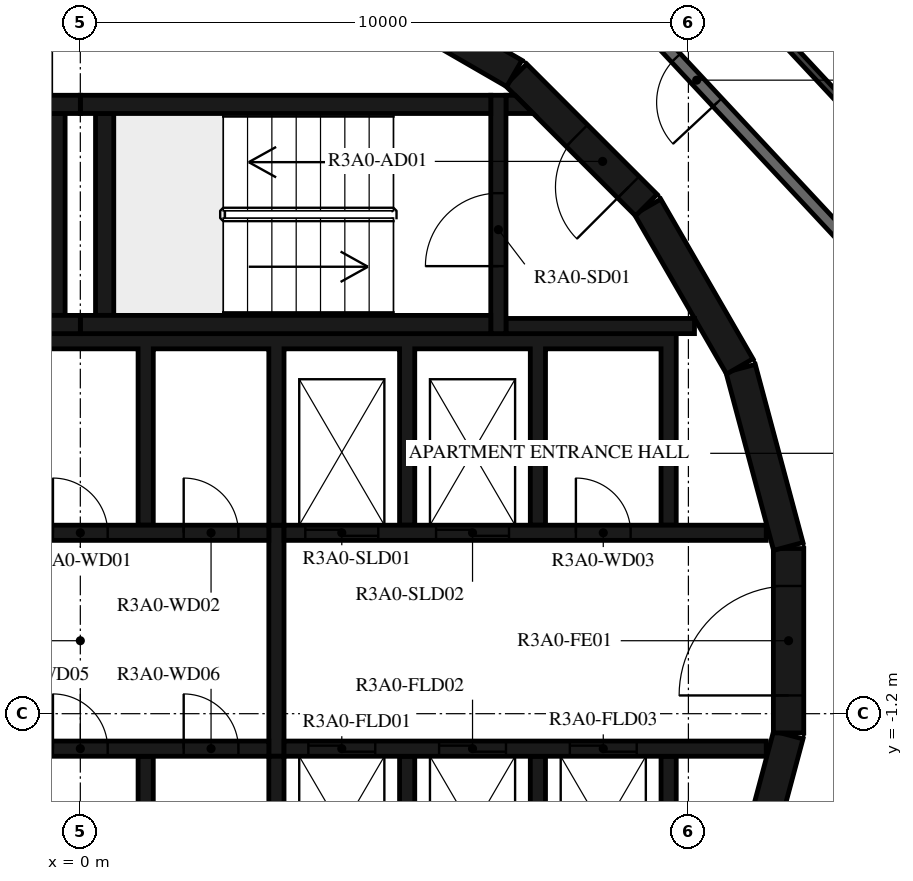
"""IFC4 building model, lengths in metres.
Left out: names, types, materials, properties, quantities, classifications, styles, units other than length and angle.
Written with IfcOpenShell. Run it as: python <this file> out.ifc"""

import sys

from ifc_helpers import new_model, si_unit, direction, frame, frame_2d, origin, place, context, subcontext, project, spatial, polyline, rectangle, outline, extrude, element, fill, save


model = new_model("IFC4")
c1 = context("Model", 3, precision=1e-05, world=origin(), true_north=direction((0.0, 1.0)))
c2 = subcontext(c1, "Body", "Model", "MODEL_VIEW")
j1 = project(units=[si_unit("LENGTHUNIT", "METRE"), si_unit("PLANEANGLEUNIT", "RADIAN")], contexts=[c1])
p1 = place(None, origin())
s1 = spatial("IfcSite", under=j1, at=p1, CompositionType="ELEMENT")
p2 = place(p1, origin())
s2 = spatial("IfcBuilding", under=s1, at=p2, CompositionType="ELEMENT")
p3 = place(p2, frame((0.0, 0.0, 120.4)))
s3 = spatial("IfcBuildingStorey", under=s2, at=p3, CompositionType="ELEMENT", Elevation=120.4)
p4 = place(p3, frame((10.858, -4.479, 0.0), z_axis=(0.0, 0.0, 1.0), x_axis=(0.258734743916, 0.965948410781, 0.0)))
e1 = element("IfcWall", 1, at=p4, inside=s3, PredefinedType="SHEAR", context=c2, shape_type="SweptSolid", body=[
    extrude(rectangle(XDim=3.033, YDim=0.5, at=frame_2d((1.516, 0.0))), origin(), (0.0, 0.0, 1.0), 3.12),
])
p5 = place(p3, frame((11.647, -1.516, 0.0), z_axis=(0.0, 0.0, 1.0), x_axis=(0.0, 1.0, 0.0)))
e2 = element("IfcWall", 2, at=p5, inside=s3, PredefinedType="SHEAR", context=c2, shape_type="SweptSolid", body=[
    extrude(rectangle(XDim=3.033, YDim=0.5, at=frame_2d((1.516, 0.0))), origin(), (0.0, 0.0, 1.0), 3.12),
])
p6 = place(p5, frame((0.616, 0.0, 0.0)))
e3 = element("IfcOpeningElement", 3, at=p6, cuts=e2, PredefinedType="OPENING", context=c2, shape_type="SweptSolid", body=[
    extrude(rectangle(XDim=1.8, YDim=2.1, at=frame_2d((0.9, 1.05))), frame((0.0, 0.26, 0.0), z_axis=(0.0, -1.0, 0.0), x_axis=(1.0, 0.0, 0.0)), (0.0, 0.0, 1.0), 0.52),
])
for number, where, z_axis, x_axis in (
    (4, (11.643, 1.55, 0.0), (0.0, 0.0, 1.0), (-0.259, 0.966, 0.0)),
    (5, (10.845, 4.51, 0.0), (0.0, 0.0, 1.0), (-0.5, 0.866, 0.0)),
):
    element("IfcWall", number, at=place(p3, frame(where, z_axis=z_axis, x_axis=x_axis)), inside=s3, PredefinedType="SHEAR", context=c2, shape_type="SweptSolid", body=[
        extrude(rectangle(XDim=3.033, YDim=0.5, at=frame_2d((1.516, 0.0))), origin(), (0.0, 0.0, 1.0), 3.12),
    ])
p7 = place(p3, frame((9.308, 7.164, 0.0), z_axis=(0.0, 0.0, 1.0), x_axis=(-0.707106781187, 0.707106781187, 0.0)))
e6 = element("IfcWall", 6, at=p7, inside=s3, PredefinedType="SHEAR", context=c2, shape_type="SweptSolid", body=[
    extrude(rectangle(XDim=3.032, YDim=0.5, at=frame_2d((1.516, 0.0))), origin(), (0.0, 0.0, 1.0), 3.12),
])
p8 = place(p7, frame((0.416, 0.0, 0.0)))
e7 = element("IfcOpeningElement", 7, at=p8, cuts=e6, PredefinedType="OPENING", context=c2, shape_type="SweptSolid", body=[
    extrude(rectangle(XDim=1.2, YDim=2.1, at=frame_2d((0.6, 1.05))), frame((0.0, 0.26, 0.0), z_axis=(0.0, -1.0, 0.0), x_axis=(1.0, 0.0, 0.0)), (0.0, 0.0, 1.0), 0.52),
])
p9 = place(p3, frame((7.137, 9.329, 0.0), z_axis=(0.0, 0.0, 1.0), x_axis=(-0.865975092491, 0.500087131594, 0.0)))
e8 = element("IfcWall", 8, at=p9, inside=s3, PredefinedType="SHEAR", context=c2, shape_type="SweptSolid", body=[
    extrude(rectangle(XDim=3.033, YDim=0.5, at=frame_2d((1.516, 0.0))), origin(), (0.0, 0.0, 1.0), 3.12),
])
for number, where, z_axis, x_axis in (
    (9, (0.0, 5.2, 0.0), (0.0, 0.0, 1.0), (1.0, 0.0, 0.0)),
    (10, (0.0, 8.82, 0.0), (0.0, 0.0, 1.0), (1.0, 0.0, 0.0)),
):
    element("IfcWall", number, at=place(p3, frame(where, z_axis=z_axis, x_axis=x_axis)), inside=s3, PredefinedType="SHEAR", context=c2, shape_type="SweptSolid", body=[
        extrude(rectangle(XDim=6.75, YDim=0.3, at=frame_2d((3.375, 0.0))), origin(), (0.0, 0.0, 1.0), 3.12),
    ])
p10 = place(p3, frame((0.4, 5.35, 0.0), z_axis=(0.0, 0.0, 1.0), x_axis=(0.0, 1.0, 0.0)))
e11 = element("IfcWall", 11, at=p10, inside=s3, PredefinedType="SHEAR", context=c2, shape_type="SweptSolid", body=[
    extrude(rectangle(XDim=3.32, YDim=0.3, at=frame_2d((1.66, 0.0))), origin(), (0.0, 0.0, 1.0), 3.12),
])
p11 = place(p3, frame((6.875, 5.05, 0.0), z_axis=(0.0, 0.0, 1.0), x_axis=(0.0, 1.0, 0.0)))
e12 = element("IfcWall", 12, at=p11, inside=s3, PredefinedType="SHEAR", context=c2, shape_type="SweptSolid", body=[
    extrude(rectangle(XDim=3.92, YDim=0.25, at=frame_2d((1.96, 0.0))), origin(), (0.0, 0.0, 1.0), 3.12),
])
p12 = place(p11, frame((1.11, 0.0, 0.0)))
e13 = element("IfcOpeningElement", 13, at=p12, cuts=e12, PredefinedType="OPENING", context=c2, shape_type="SweptSolid", body=[
    extrude(rectangle(XDim=1.2, YDim=2.1, at=frame_2d((0.6, 1.05))), frame((0.0, 0.135, 0.0), z_axis=(0.0, -1.0, 0.0), x_axis=(1.0, 0.0, 0.0)), (0.0, 0.0, 1.0), 0.27),
])
p13 = place(p3, frame((7.0, 5.175, 0.0), z_axis=(0.0, 0.0, 1.0), x_axis=(1.0, 0.0, 0.0)))
e14 = element("IfcWall", 14, at=p13, inside=s3, PredefinedType="SHEAR", context=c2, shape_type="SweptSolid", body=[
    extrude(rectangle(XDim=3.1, YDim=0.25, at=frame_2d((1.55, 0.0))), origin(), (0.0, 0.0, 1.0), 3.12),
])
p14 = place(p3, origin())
e15 = element("IfcWall", 15, at=p14, inside=s3, PredefinedType="SHEAR", context=c2, shape_type="SweptSolid", body=[
    extrude(outline(polyline([(7.448, 8.67), (7.0, 8.67), (7.0, 8.97), (7.148, 8.97), (7.448, 8.67)])), origin(), (0.0, 0.0, 1.0), 3.12),
])
for number, where, z_axis, x_axis in (
    (16, (-6.75, 5.2, 0.0), (0.0, 0.0, 1.0), (1.0, 0.0, 0.0)),
    (17, (-6.75, 8.82, 0.0), (0.0, 0.0, 1.0), (1.0, 0.0, 0.0)),
):
    element("IfcWall", number, at=place(p3, frame(where, z_axis=z_axis, x_axis=x_axis)), inside=s3, PredefinedType="SHEAR", context=c2, shape_type="SweptSolid", body=[
        extrude(rectangle(XDim=6.75, YDim=0.3, at=frame_2d((3.375, 0.0))), origin(), (0.0, 0.0, 1.0), 3.12),
    ])
p15 = place(p3, frame((-0.4, 5.35, 0.0), z_axis=(0.0, 0.0, 1.0), x_axis=(0.0, 1.0, 0.0)))
e18 = element("IfcWall", 18, at=p15, inside=s3, PredefinedType="SHEAR", context=c2, shape_type="SweptSolid", body=[
    extrude(rectangle(XDim=3.32, YDim=0.3, at=frame_2d((1.66, 0.0))), origin(), (0.0, 0.0, 1.0), 3.12),
])
p16 = place(p3, origin())
e19 = element("IfcWall", 19, at=p16, inside=s3, PredefinedType="SHEAR", context=c2, shape_type="SweptSolid", body=[
    extrude(outline(polyline([(-9.55, 4.8), (-7.65, 4.8), (-7.65, 1.9), (-7.4, 1.9), (-7.4, 4.8), (-5.5, 4.8), (-5.5, 1.9), (-5.25, 1.9), (-5.25, 4.8), (-3.35, 4.8), (-3.35, 1.9), (-3.1, 1.9), (-3.1, 4.8), (-1.2, 4.8), (-1.2, 1.9), (-0.95, 1.9), (-0.95, 4.8), (0.95, 4.8), (0.95, 1.9), (1.2, 1.9), (1.2, 4.8), (3.1, 4.8), (3.1, 1.9), (3.35, 1.9), (3.35, 4.8), (5.25, 4.8), (5.25, 1.9), (5.5, 1.9), (5.5, 4.8), (7.4, 4.8), (7.4, 1.9), (7.65, 1.9), (7.65, 4.8), (9.55, 4.8), (9.55, 1.9), (9.8, 1.9), (9.8, 4.8), (9.8, 5.05), (-9.8, 5.05), (-9.8, 4.8), (-9.8, 1.9), (-9.55, 1.9), (-9.55, 4.8)])), origin(), (0.0, 0.0, 1.0), 3.12),
])
p17 = place(p3, origin())
e20 = element("IfcWall", 20, at=p17, inside=s3, PredefinedType="SHEAR", context=c2, shape_type="SweptSolid", body=[
    extrude(outline(polyline([(9.8, -5.05), (9.8, -4.8), (9.8, -1.9), (9.55, -1.9), (9.55, -4.8), (7.65, -4.8), (7.65, -1.9), (7.4, -1.9), (7.4, -4.8), (5.5, -4.8), (5.5, -1.9), (5.25, -1.9), (5.25, -4.8), (3.35, -4.8), (3.35, -1.9), (3.1, -1.9), (3.1, -4.8), (1.2, -4.8), (1.2, -1.9), (0.95, -1.9), (0.95, -4.8), (-0.95, -4.8), (-0.95, -1.9), (-1.2, -1.9), (-1.2, -4.8), (-5.25, -4.8), (-5.25, -1.9), (-5.5, -1.9), (-5.5, -4.8), (-7.4, -4.8), (-7.4, -1.9), (-7.65, -1.9), (-7.65, -4.8), (-9.55, -4.8), (-9.55, -1.9), (-9.8, -1.9), (-9.8, -4.8), (-9.8, -5.05), (9.8, -5.05)])), origin(), (0.0, 0.0, 1.0), 3.12),
])
p18 = place(p3, frame((-11.28, 1.775, 0.0), z_axis=(0.0, 0.0, 1.0), x_axis=(1.0, 0.0, 0.0)))
e21 = element("IfcWall", 21, at=p18, inside=s3, PredefinedType="SHEAR", context=c2, shape_type="SweptSolid", body=[
    extrude(rectangle(XDim=14.38, YDim=0.25, at=frame_2d((7.19, 0.0))), origin(), (0.0, 0.0, 1.0), 3.12),
])
p19 = place(p18, frame((2.13, 0.0, 0.0)))
e22 = element("IfcOpeningElement", 22, at=p19, cuts=e21, PredefinedType="OPENING", context=c2, shape_type="SweptSolid", body=[
    extrude(rectangle(XDim=1.1, YDim=2.1, at=frame_2d((0.55, 1.05))), frame((0.0, 0.135, 0.0), z_axis=(0.0, -1.0, 0.0), x_axis=(1.0, 0.0, 0.0)), (0.0, 0.0, 1.0), 0.27),
])
p20 = place(p18, frame((4.28, 0.0, 0.0)))
e23 = element("IfcOpeningElement", 23, at=p20, cuts=e21, PredefinedType="OPENING", context=c2, shape_type="SweptSolid", body=[
    extrude(rectangle(XDim=1.1, YDim=2.1, at=frame_2d((0.55, 1.05))), frame((0.0, 0.135, 0.0), z_axis=(0.0, -1.0, 0.0), x_axis=(1.0, 0.0, 0.0)), (0.0, 0.0, 1.0), 0.27),
])
p21 = place(p18, frame((6.43, 0.0, 0.0)))
e24 = element("IfcOpeningElement", 24, at=p21, cuts=e21, PredefinedType="OPENING", context=c2, shape_type="SweptSolid", body=[
    extrude(rectangle(XDim=1.1, YDim=2.1, at=frame_2d((0.55, 1.05))), frame((0.0, 0.135, 0.0), z_axis=(0.0, -1.0, 0.0), x_axis=(1.0, 0.0, 0.0)), (0.0, 0.0, 1.0), 0.27),
])
p22 = place(p18, frame((8.58, 0.0, 0.0)))
e25 = element("IfcOpeningElement", 25, at=p22, cuts=e21, PredefinedType="OPENING", context=c2, shape_type="SweptSolid", body=[
    extrude(rectangle(XDim=1.1, YDim=2.1, at=frame_2d((0.55, 1.05))), frame((0.0, 0.135, 0.0), z_axis=(0.0, -1.0, 0.0), x_axis=(1.0, 0.0, 0.0)), (0.0, 0.0, 1.0), 0.27),
])
p23 = place(p18, frame((10.83, 0.0, 0.0)))
e26 = element("IfcOpeningElement", 26, at=p23, cuts=e21, PredefinedType="OPENING", context=c2, shape_type="SweptSolid", body=[
    extrude(rectangle(XDim=0.9, YDim=2.1, at=frame_2d((0.45, 1.05))), frame((0.0, 0.135, 0.0), z_axis=(0.0, -1.0, 0.0), x_axis=(1.0, 0.0, 0.0)), (0.0, 0.0, 1.0), 0.27),
])
p24 = place(p18, frame((12.98, 0.0, 0.0)))
e27 = element("IfcOpeningElement", 27, at=p24, cuts=e21, PredefinedType="OPENING", context=c2, shape_type="SweptSolid", body=[
    extrude(rectangle(XDim=0.9, YDim=2.1, at=frame_2d((0.45, 1.05))), frame((0.0, 0.135, 0.0), z_axis=(0.0, -1.0, 0.0), x_axis=(1.0, 0.0, 0.0)), (0.0, 0.0, 1.0), 0.27),
])
p25 = place(p3, frame((3.35, 1.775, 0.0), z_axis=(0.0, 0.0, 1.0), x_axis=(1.0, 0.0, 0.0)))
e28 = element("IfcWall", 28, at=p25, inside=s3, PredefinedType="SHEAR", context=c2, shape_type="SweptSolid", body=[
    extrude(rectangle(XDim=7.93, YDim=0.25, at=frame_2d((3.965, 0.0))), origin(), (0.0, 0.0, 1.0), 3.12),
])
p26 = place(p25, frame((0.35, 0.0, 0.0)))
e29 = element("IfcOpeningElement", 29, at=p26, cuts=e28, PredefinedType="OPENING", context=c2, shape_type="SweptSolid", body=[
    extrude(rectangle(XDim=1.2, YDim=2.4, at=frame_2d((0.6, 1.2))), frame((0.0, 0.135, 0.0), z_axis=(0.0, -1.0, 0.0), x_axis=(1.0, 0.0, 0.0)), (0.0, 0.0, 1.0), 0.27),
])
p27 = place(p25, frame((2.5, 0.0, 0.0)))
e30 = element("IfcOpeningElement", 30, at=p27, cuts=e28, PredefinedType="OPENING", context=c2, shape_type="SweptSolid", body=[
    extrude(rectangle(XDim=1.2, YDim=2.4, at=frame_2d((0.6, 1.2))), frame((0.0, 0.135, 0.0), z_axis=(0.0, -1.0, 0.0), x_axis=(1.0, 0.0, 0.0)), (0.0, 0.0, 1.0), 0.27),
])
p28 = place(p25, frame((4.8, 0.0, 0.0)))
e31 = element("IfcOpeningElement", 31, at=p28, cuts=e28, PredefinedType="OPENING", context=c2, shape_type="SweptSolid", body=[
    extrude(rectangle(XDim=0.9, YDim=2.1, at=frame_2d((0.45, 1.05))), frame((0.0, 0.135, 0.0), z_axis=(0.0, -1.0, 0.0), x_axis=(1.0, 0.0, 0.0)), (0.0, 0.0, 1.0), 0.27),
])
p29 = place(p3, frame((-11.28, -1.775, 0.0), z_axis=(0.0, 0.0, 1.0), x_axis=(1.0, 0.0, 0.0)))
e32 = element("IfcWall", 32, at=p29, inside=s3, PredefinedType="SHEAR", context=c2, shape_type="SweptSolid", body=[
    extrude(rectangle(XDim=14.38, YDim=0.25, at=frame_2d((7.19, 0.0))), origin(), (0.0, 0.0, 1.0), 3.12),
])
p30 = place(p29, frame((7.605, 0.0, 0.0)))
e33 = element("IfcOpeningElement", 33, at=p30, cuts=e32, PredefinedType="OPENING", context=c2, shape_type="SweptSolid", body=[
    extrude(rectangle(XDim=0.9, YDim=2.1, at=frame_2d((0.45, 1.05))), frame((0.0, 0.135, 0.0), z_axis=(0.0, -1.0, 0.0), x_axis=(1.0, 0.0, 0.0)), (0.0, 0.0, 1.0), 0.27),
])
p31 = place(p29, frame((10.83, 0.0, 0.0)))
e34 = element("IfcOpeningElement", 34, at=p31, cuts=e32, PredefinedType="OPENING", context=c2, shape_type="SweptSolid", body=[
    extrude(rectangle(XDim=0.9, YDim=2.1, at=frame_2d((0.45, 1.05))), frame((0.0, 0.135, 0.0), z_axis=(0.0, -1.0, 0.0), x_axis=(1.0, 0.0, 0.0)), (0.0, 0.0, 1.0), 0.27),
])
p32 = place(p29, frame((12.98, 0.0, 0.0)))
e35 = element("IfcOpeningElement", 35, at=p32, cuts=e32, PredefinedType="OPENING", context=c2, shape_type="SweptSolid", body=[
    extrude(rectangle(XDim=0.9, YDim=2.1, at=frame_2d((0.45, 1.05))), frame((0.0, 0.135, 0.0), z_axis=(0.0, -1.0, 0.0), x_axis=(1.0, 0.0, 0.0)), (0.0, 0.0, 1.0), 0.27),
])
p33 = place(p3, frame((3.35, -1.775, 0.0), z_axis=(0.0, 0.0, 1.0), x_axis=(1.0, 0.0, 0.0)))
e36 = element("IfcWall", 36, at=p33, inside=s3, PredefinedType="SHEAR", context=c2, shape_type="SweptSolid", body=[
    extrude(rectangle(XDim=7.93, YDim=0.25, at=frame_2d((3.965, 0.0))), origin(), (0.0, 0.0, 1.0), 3.12),
])
p34 = place(p33, frame((0.4, 0.0, 0.0)))
e37 = element("IfcOpeningElement", 37, at=p34, cuts=e36, PredefinedType="OPENING", context=c2, shape_type="SweptSolid", body=[
    extrude(rectangle(XDim=1.1, YDim=2.4, at=frame_2d((0.55, 1.2))), frame((0.0, 0.135, 0.0), z_axis=(0.0, -1.0, 0.0), x_axis=(1.0, 0.0, 0.0)), (0.0, 0.0, 1.0), 0.27),
])
p35 = place(p33, frame((2.55, 0.0, 0.0)))
e38 = element("IfcOpeningElement", 38, at=p35, cuts=e36, PredefinedType="OPENING", context=c2, shape_type="SweptSolid", body=[
    extrude(rectangle(XDim=1.1, YDim=2.4, at=frame_2d((0.55, 1.2))), frame((0.0, 0.135, 0.0), z_axis=(0.0, -1.0, 0.0), x_axis=(1.0, 0.0, 0.0)), (0.0, 0.0, 1.0), 0.27),
])
p36 = place(p33, frame((4.7, 0.0, 0.0)))
e39 = element("IfcOpeningElement", 39, at=p36, cuts=e36, PredefinedType="OPENING", context=c2, shape_type="SweptSolid", body=[
    extrude(rectangle(XDim=1.1, YDim=2.4, at=frame_2d((0.55, 1.2))), frame((0.0, 0.135, 0.0), z_axis=(0.0, -1.0, 0.0), x_axis=(1.0, 0.0, 0.0)), (0.0, 0.0, 1.0), 0.27),
])
p37 = place(p3, frame((3.225, -1.9, 0.0), z_axis=(0.0, 0.0, 1.0), x_axis=(0.0, 1.0, 0.0)))
e40 = element("IfcWall", 40, at=p37, inside=s3, PredefinedType="SHEAR", context=c2, shape_type="SweptSolid", body=[
    extrude(rectangle(XDim=3.8, YDim=0.25, at=frame_2d((1.9, 0.0))), origin(), (0.0, 0.0, 1.0), 3.12),
])
p38 = place(p3, frame((12.028, -7.516, 0.0), z_axis=(0.0, 0.0, 1.0), x_axis=(0.292365533182, 0.956306642771, 0.0)))
e41 = element("IfcWall", 41, at=p38, inside=s3, PredefinedType="STANDARD", context=c2, shape_type="SweptSolid", body=[
    extrude(rectangle(XDim=7.342, YDim=0.2, at=frame_2d((3.671, 0.0))), origin(), (0.0, 0.0, 1.0), 3.12),
])
p39 = place(p3, frame((12.523, 6.659, 0.0), z_axis=(0.0, 0.0, 1.0), x_axis=(-0.682001841105, 0.731350455479, 0.0)))
e42 = element("IfcWall", 42, at=p39, inside=s3, PredefinedType="STANDARD", context=c2, shape_type="SweptSolid", body=[
    extrude(rectangle(XDim=7.342, YDim=0.2, at=frame_2d((3.671, 0.0))), origin(), (0.0, 0.0, 1.0), 3.12),
])
p40 = place(p39, frame((3.0, 0.0, 0.0)))
e43 = element("IfcOpeningElement", 43, at=p40, cuts=e42, PredefinedType="OPENING", context=c2, shape_type="SweptSolid", body=[
    extrude(rectangle(XDim=1.0, YDim=2.1, at=frame_2d((0.5, 1.05))), frame((0.0, 0.11, 0.0), z_axis=(0.0, -1.0, 0.0), x_axis=(1.0, 0.0, 0.0)), (0.0, 0.0, 1.0), 0.22),
])
p41 = place(p39, frame((5.209, 0.0, 0.0)))
e44 = element("IfcOpeningElement", 44, at=p41, cuts=e42, PredefinedType="OPENING", context=c2, shape_type="SweptSolid", body=[
    extrude(rectangle(XDim=1.0, YDim=2.1, at=frame_2d((0.5, 1.05))), frame((0.0, 0.11, 0.0), z_axis=(0.0, -1.0, 0.0), x_axis=(1.0, 0.0, 0.0)), (0.0, 0.0, 1.0), 0.22),
])
p42 = place(p3, frame((13.894, 7.388, 0.0), z_axis=(0.0, 0.0, 1.0), x_axis=(-0.681994622729, 0.731357186721, 0.0)))
e45 = element("IfcWall", 45, at=p42, inside=s3, PredefinedType="PARTITIONING", context=c2, shape_type="SweptSolid", body=[
    extrude(rectangle(XDim=8.146, YDim=0.12, at=frame_2d((4.073, 0.0))), origin(), (0.0, 0.0, 1.0), 3.12),
])
p43 = place(p42, frame((0.2, 0.0, 0.0)))
e46 = element("IfcOpeningElement", 46, at=p43, cuts=e45, PredefinedType="OPENING", context=c2, shape_type="SweptSolid", body=[
    extrude(rectangle(XDim=0.9, YDim=2.1, at=frame_2d((0.45, 1.05))), frame((0.0, 0.07, 0.0), z_axis=(0.0, -1.0, 0.0), x_axis=(1.0, 0.0, 0.0)), (0.0, 0.0, 1.0), 0.14),
])
p44 = place(p12, origin())
e47 = element("IfcDoor", 47, at=p44, inside=s3, OperationType="SINGLE_SWING_LEFT", PredefinedType="DOOR", context=c2, shape_type="SweptSolid", body=[
    extrude(rectangle(XDim=1.2, YDim=2.1, at=frame_2d((0.6, 1.05))), frame((0.0, 0.025, 0.0), z_axis=(0.0, -1.0, 0.0), x_axis=(1.0, 0.0, 0.0)), (0.0, 0.0, 1.0), 0.05),
])
fill(e13, e47)
p45 = place(p8, origin())
e48 = element("IfcDoor", 48, at=p45, inside=s3, OperationType="SINGLE_SWING_RIGHT", PredefinedType="DOOR", context=c2, shape_type="SweptSolid", body=[
    extrude(rectangle(XDim=1.2, YDim=2.1, at=frame_2d((0.6, 1.05))), frame((0.0, 0.025, 0.0), z_axis=(0.0, -1.0, 0.0), x_axis=(1.0, 0.0, 0.0)), (0.0, 0.0, 1.0), 0.05),
])
fill(e7, e48)
p46 = place(p6, origin())
e49 = element("IfcDoor", 49, at=p46, inside=s3, OperationType="DOUBLE_DOOR_SINGLE_SWING", PredefinedType="DOOR", context=c2, shape_type="SweptSolid", body=[
    extrude(rectangle(XDim=1.8, YDim=2.1, at=frame_2d((0.9, 1.05))), frame((0.0, 0.025, 0.0), z_axis=(0.0, -1.0, 0.0), x_axis=(1.0, 0.0, 0.0)), (0.0, 0.0, 1.0), 0.05),
])
fill(e3, e49)
p47 = place(p26, origin())
e50 = element("IfcDoor", 50, at=p47, inside=s3, OperationType="DOUBLE_DOOR_SLIDING", PredefinedType="DOOR", context=c2, shape_type="SweptSolid", body=[
    extrude(rectangle(XDim=1.2, YDim=2.4, at=frame_2d((0.6, 1.2))), frame((0.0, 0.025, 0.0), z_axis=(0.0, -1.0, 0.0), x_axis=(1.0, 0.0, 0.0)), (0.0, 0.0, 1.0), 0.05),
])
fill(e29, e50)
p48 = place(p27, origin())
e51 = element("IfcDoor", 51, at=p48, inside=s3, OperationType="DOUBLE_DOOR_SLIDING", PredefinedType="DOOR", context=c2, shape_type="SweptSolid", body=[
    extrude(rectangle(XDim=1.2, YDim=2.4, at=frame_2d((0.6, 1.2))), frame((0.0, 0.025, 0.0), z_axis=(0.0, -1.0, 0.0), x_axis=(1.0, 0.0, 0.0)), (0.0, 0.0, 1.0), 0.05),
])
fill(e30, e51)
p49 = place(p34, origin())
e52 = element("IfcDoor", 52, at=p49, inside=s3, OperationType="DOUBLE_DOOR_SLIDING", PredefinedType="DOOR", context=c2, shape_type="SweptSolid", body=[
    extrude(rectangle(XDim=1.1, YDim=2.4, at=frame_2d((0.55, 1.2))), frame((0.0, 0.025, 0.0), z_axis=(0.0, -1.0, 0.0), x_axis=(1.0, 0.0, 0.0)), (0.0, 0.0, 1.0), 0.05),
])
fill(e37, e52)
p50 = place(p35, origin())
e53 = element("IfcDoor", 53, at=p50, inside=s3, OperationType="DOUBLE_DOOR_SLIDING", PredefinedType="DOOR", context=c2, shape_type="SweptSolid", body=[
    extrude(rectangle(XDim=1.1, YDim=2.4, at=frame_2d((0.55, 1.2))), frame((0.0, 0.025, 0.0), z_axis=(0.0, -1.0, 0.0), x_axis=(1.0, 0.0, 0.0)), (0.0, 0.0, 1.0), 0.05),
])
fill(e38, e53)
p51 = place(p36, origin())
e54 = element("IfcDoor", 54, at=p51, inside=s3, OperationType="DOUBLE_DOOR_SLIDING", PredefinedType="DOOR", context=c2, shape_type="SweptSolid", body=[
    extrude(rectangle(XDim=1.1, YDim=2.4, at=frame_2d((0.55, 1.2))), frame((0.0, 0.025, 0.0), z_axis=(0.0, -1.0, 0.0), x_axis=(1.0, 0.0, 0.0)), (0.0, 0.0, 1.0), 0.05),
])
fill(e39, e54)
p52 = place(p23, origin())
e55 = element("IfcDoor", 55, at=p52, inside=s3, OperationType="SINGLE_SWING_RIGHT", PredefinedType="DOOR", context=c2, shape_type="SweptSolid", body=[
    extrude(rectangle(XDim=0.9, YDim=2.1, at=frame_2d((0.45, 1.05))), frame((0.0, 0.025, 0.0), z_axis=(0.0, -1.0, 0.0), x_axis=(1.0, 0.0, 0.0)), (0.0, 0.0, 1.0), 0.05),
])
fill(e26, e55)
p53 = place(p24, origin())
e56 = element("IfcDoor", 56, at=p53, inside=s3, OperationType="SINGLE_SWING_LEFT", PredefinedType="DOOR", context=c2, shape_type="SweptSolid", body=[
    extrude(rectangle(XDim=0.9, YDim=2.1, at=frame_2d((0.45, 1.05))), frame((0.0, 0.025, 0.0), z_axis=(0.0, -1.0, 0.0), x_axis=(1.0, 0.0, 0.0)), (0.0, 0.0, 1.0), 0.05),
])
fill(e27, e56)
p54 = place(p28, origin())
e57 = element("IfcDoor", 57, at=p54, inside=s3, OperationType="SINGLE_SWING_RIGHT", PredefinedType="DOOR", context=c2, shape_type="SweptSolid", body=[
    extrude(rectangle(XDim=0.9, YDim=2.1, at=frame_2d((0.45, 1.05))), frame((0.0, 0.025, 0.0), z_axis=(0.0, -1.0, 0.0), x_axis=(1.0, 0.0, 0.0)), (0.0, 0.0, 1.0), 0.05),
])
fill(e31, e57)
p55 = place(p31, origin())
e58 = element("IfcDoor", 58, at=p55, inside=s3, OperationType="SINGLE_SWING_RIGHT", PredefinedType="DOOR", context=c2, shape_type="SweptSolid", body=[
    extrude(rectangle(XDim=0.9, YDim=2.1, at=frame_2d((0.45, 1.05))), frame((0.0, 0.025, 0.0), z_axis=(0.0, -1.0, 0.0), x_axis=(1.0, 0.0, 0.0)), (0.0, 0.0, 1.0), 0.05),
])
fill(e34, e58)
p56 = place(p32, origin())
e59 = element("IfcDoor", 59, at=p56, inside=s3, OperationType="SINGLE_SWING_LEFT", PredefinedType="DOOR", context=c2, shape_type="SweptSolid", body=[
    extrude(rectangle(XDim=0.9, YDim=2.1, at=frame_2d((0.45, 1.05))), frame((0.0, 0.025, 0.0), z_axis=(0.0, -1.0, 0.0), x_axis=(1.0, 0.0, 0.0)), (0.0, 0.0, 1.0), 0.05),
])
fill(e35, e59)
p57 = place(p40, origin())
e60 = element("IfcDoor", 60, at=p57, inside=s3, OperationType="SINGLE_SWING_LEFT", PredefinedType="DOOR", context=c2, shape_type="SweptSolid", body=[
    extrude(rectangle(XDim=1.0, YDim=2.1, at=frame_2d((0.5, 1.05))), frame((0.0, 0.025, 0.0), z_axis=(0.0, -1.0, 0.0), x_axis=(1.0, 0.0, 0.0)), (0.0, 0.0, 1.0), 0.05),
])
fill(e43, e60)
save(model, sys.argv[1])
